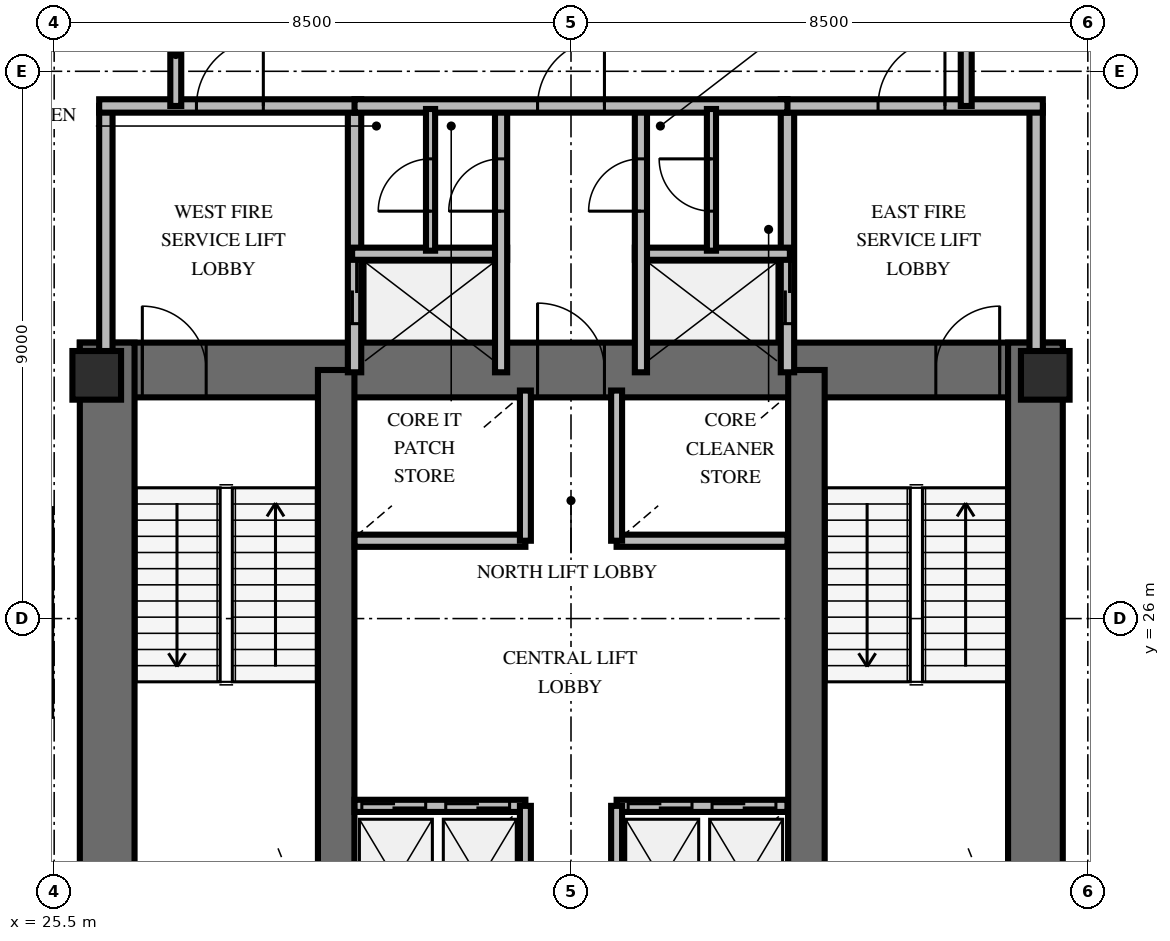
"""IFC4 building model, lengths in metres.
Left out: names, types, materials, properties, quantities, classifications, styles, units other than length and angle.
Written with IfcOpenShell. Run it as: python <this file> out.ifc"""

import sys

from ifc_helpers import new_model, si_unit, direction, frame, frame_2d, origin, origin_2d, place, context, subcontext, project, spatial, rectangle, extrude, element, fill, save


model = new_model("IFC4")
c1 = context("Model", 3, precision=1e-05, world=origin(), true_north=direction((0.0, 1.0)))
c2 = subcontext(c1, "Body", "Model", "MODEL_VIEW")
j1 = project(units=[si_unit("LENGTHUNIT", "METRE"), si_unit("PLANEANGLEUNIT", "RADIAN")], contexts=[c1])
p1 = place(None, origin())
s1 = spatial("IfcSite", under=j1, at=p1, CompositionType="ELEMENT")
p2 = place(p1, origin())
s2 = spatial("IfcBuilding", under=s1, at=p2, CompositionType="ELEMENT")
p3 = place(p2, frame((0.0, 0.0, 55.2)))
s3 = spatial("IfcBuildingStorey", under=s2, at=p3, CompositionType="ELEMENT", Elevation=55.2)
p4 = place(p3, frame((25.922, 30.088, 0.0), z_axis=(0.0, 0.0, 1.0), x_axis=(1.0, 0.0, 0.0)))
e1 = element("IfcWall", 1, at=p4, inside=s3, PredefinedType="SHEAR", context=c2, shape_type="SweptSolid", body=[
    extrude(rectangle(XDim=16.166, YDim=0.9, at=frame_2d((8.083, 0.0))), origin(), (0.0, 0.0, 1.0), 4.2),
])
p5 = place(p4, frame((1.028, 0.0, 0.0)))
e2 = element("IfcOpeningElement", 2, at=p5, cuts=e1, PredefinedType="OPENING", context=c2, shape_type="SweptSolid", body=[
    extrude(rectangle(XDim=1.05, YDim=2.15, at=frame_2d((0.525, 1.075))), frame((0.0, 0.46, 0.0), z_axis=(0.0, -1.0, 0.0), x_axis=(1.0, 0.0, 0.0)), (0.0, 0.0, 1.0), 0.92),
])
p6 = place(p4, frame((14.078, 0.0, 0.0)))
e3 = element("IfcOpeningElement", 3, at=p6, cuts=e1, PredefinedType="OPENING", context=c2, shape_type="SweptSolid", body=[
    extrude(rectangle(XDim=1.05, YDim=2.15, at=frame_2d((0.525, 1.075))), frame((0.0, 0.46, 0.0), z_axis=(0.0, -1.0, 0.0), x_axis=(1.0, 0.0, 0.0)), (0.0, 0.0, 1.0), 0.92),
])
p7 = place(p4, frame((7.528, 0.0, 0.0)))
e4 = element("IfcOpeningElement", 4, at=p7, cuts=e1, PredefinedType="OPENING", context=c2, shape_type="SweptSolid", body=[
    extrude(rectangle(XDim=1.1, YDim=2.15, at=frame_2d((0.55, 1.075))), frame((0.0, 0.46, 0.0), z_axis=(0.0, -1.0, 0.0), x_axis=(1.0, 0.0, 0.0)), (0.0, 0.0, 1.0), 0.92),
])
for number, where, z_axis, x_axis in (
    (5, (26.372, 19.662, 0.0), (0.0, 0.0, 1.0), (0.0, 1.0, 0.0)),
    (6, (41.638, 19.662, 0.0), (0.0, 0.0, 1.0), (0.0, 1.0, 0.0)),
):
    element("IfcWall", number, at=place(p3, frame(where, z_axis=z_axis, x_axis=x_axis)), inside=s3, PredefinedType="SHEAR", context=c2, shape_type="SweptSolid", body=[
        extrude(rectangle(XDim=10.876, YDim=0.9, at=frame_2d((5.438, 0.0))), origin(), (0.0, 0.0, 1.0), 4.2),
    ])
for number, where, z_axis, x_axis in (
    (7, (30.138, 20.112, 0.0), (0.0, 0.0, 1.0), (0.0, 1.0, 0.0)),
    (8, (37.872, 20.112, 0.0), (0.0, 0.0, 1.0), (0.0, 1.0, 0.0)),
):
    element("IfcWall", number, at=place(p3, frame(where, z_axis=z_axis, x_axis=x_axis)), inside=s3, PredefinedType="SHEAR", context=c2, shape_type="SweptSolid", body=[
        extrude(rectangle(XDim=9.976, YDim=0.6, at=frame_2d((4.988, 0.0))), origin(), (0.0, 0.0, 1.0), 4.2),
    ])
for number, where, z_axis, x_axis in (
    (9, (26.2, 30.0, 0.0), (0.0, 0.0, 1.0), (1.0, 0.0, 0.0)),
    (10, (41.8, 30.0, 0.0), (0.0, 0.0, 1.0), (1.0, 0.0, 0.0)),
):
    element("IfcColumn", number, at=place(p3, frame(where, z_axis=z_axis, x_axis=x_axis)), inside=s3, PredefinedType="PILASTER", context=c2, shape_type="SweptSolid", body=[
        extrude(rectangle(XDim=0.8, YDim=0.8, at=origin_2d()), origin(), (0.0, 0.0, 1.0), 4.2),
    ])
p8 = place(p3, frame((26.35, 30.05, 0.0), z_axis=(0.0, 0.0, 1.0), x_axis=(0.0, 1.0, 0.0)))
e11 = element("IfcWall", 11, at=p8, inside=s3, PredefinedType="SOLIDWALL", context=c2, shape_type="SweptSolid", body=[
    extrude(rectangle(XDim=4.38, YDim=0.22, at=frame_2d((2.19, 0.0))), origin(), (0.0, 0.0, 1.0), 3.0),
])
p9 = place(p3, frame((30.44, 30.05, 0.0), z_axis=(0.0, 0.0, 1.0), x_axis=(0.0, 1.0, 0.0)))
e12 = element("IfcWall", 12, at=p9, inside=s3, PredefinedType="SOLIDWALL", context=c2, shape_type="SweptSolid", body=[
    extrude(rectangle(XDim=4.38, YDim=0.22, at=frame_2d((2.19, 0.0))), origin(), (0.0, 0.0, 1.0), 3.0),
])
p10 = place(p9, frame((0.8, 0.0, 0.0)))
e13 = element("IfcOpeningElement", 13, at=p10, cuts=e12, PredefinedType="OPENING", context=c2, shape_type="SweptSolid", body=[
    extrude(rectangle(XDim=1.05, YDim=2.1, at=frame_2d((0.525, 1.05))), frame((0.0, 0.12, 0.0), z_axis=(0.0, -1.0, 0.0), x_axis=(1.0, 0.0, 0.0)), (0.0, 0.0, 1.0), 0.24),
])
p11 = place(p3, frame((26.24, 34.43, 0.0), z_axis=(0.0, 0.0, 1.0), x_axis=(1.0, 0.0, 0.0)))
e14 = element("IfcWall", 14, at=p11, inside=s3, PredefinedType="SOLIDWALL", context=c2, shape_type="SweptSolid", body=[
    extrude(rectangle(XDim=4.31, YDim=0.22, at=frame_2d((2.155, 0.0))), origin(), (0.0, 0.0, 1.0), 3.0),
])
p12 = place(p11, frame((1.6, 0.0, 0.0)))
e15 = element("IfcOpeningElement", 15, at=p12, cuts=e14, PredefinedType="OPENING", context=c2, shape_type="SweptSolid", body=[
    extrude(rectangle(XDim=1.1, YDim=2.15, at=frame_2d((0.55, 1.075))), frame((0.0, 0.12, 0.0), z_axis=(0.0, -1.0, 0.0), x_axis=(1.0, 0.0, 0.0)), (0.0, 0.0, 1.0), 0.24),
])
p13 = place(p3, frame((30.4, 32.0, 0.0), z_axis=(0.0, 0.0, 1.0), x_axis=(1.0, 0.0, 0.0)))
e16 = element("IfcWall", 16, at=p13, inside=s3, PredefinedType="SOLIDWALL", context=c2, shape_type="SweptSolid", body=[
    extrude(rectangle(XDim=2.55, YDim=0.2, at=frame_2d((1.275, 0.0))), origin(), (0.0, 0.0, 1.0), 3.0),
])
p14 = place(p3, frame((32.85, 30.05, 0.0), z_axis=(0.0, 0.0, 1.0), x_axis=(0.0, 1.0, 0.0)))
e17 = element("IfcWall", 17, at=p14, inside=s3, PredefinedType="SOLIDWALL", context=c2, shape_type="SweptSolid", body=[
    extrude(rectangle(XDim=4.38, YDim=0.2, at=frame_2d((2.19, 0.0))), origin(), (0.0, 0.0, 1.0), 3.0),
])
p15 = place(p14, frame((2.65, 0.0, 0.0)))
e18 = element("IfcOpeningElement", 18, at=p15, cuts=e17, PredefinedType="OPENING", context=c2, shape_type="SweptSolid", body=[
    extrude(rectangle(XDim=0.86, YDim=2.05, at=frame_2d((0.43, 1.025))), frame((0.0, 0.11, 0.0), z_axis=(0.0, -1.0, 0.0), x_axis=(1.0, 0.0, 0.0)), (0.0, 0.0, 1.0), 0.22),
])
p16 = place(p3, frame((37.56, 30.05, 0.0), z_axis=(0.0, 0.0, 1.0), x_axis=(0.0, 1.0, 0.0)))
e19 = element("IfcWall", 19, at=p16, inside=s3, PredefinedType="SOLIDWALL", context=c2, shape_type="SweptSolid", body=[
    extrude(rectangle(XDim=4.38, YDim=0.22, at=frame_2d((2.19, 0.0))), origin(), (0.0, 0.0, 1.0), 3.0),
])
p17 = place(p16, frame((0.8, 0.0, 0.0)))
e20 = element("IfcOpeningElement", 20, at=p17, cuts=e19, PredefinedType="OPENING", context=c2, shape_type="SweptSolid", body=[
    extrude(rectangle(XDim=1.05, YDim=2.1, at=frame_2d((0.525, 1.05))), frame((0.0, 0.12, 0.0), z_axis=(0.0, -1.0, 0.0), x_axis=(1.0, 0.0, 0.0)), (0.0, 0.0, 1.0), 0.24),
])
p18 = place(p3, frame((41.65, 30.05, 0.0), z_axis=(0.0, 0.0, 1.0), x_axis=(0.0, 1.0, 0.0)))
e21 = element("IfcWall", 21, at=p18, inside=s3, PredefinedType="SOLIDWALL", context=c2, shape_type="SweptSolid", body=[
    extrude(rectangle(XDim=4.38, YDim=0.22, at=frame_2d((2.19, 0.0))), origin(), (0.0, 0.0, 1.0), 3.0),
])
p19 = place(p3, frame((37.45, 34.43, 0.0), z_axis=(0.0, 0.0, 1.0), x_axis=(1.0, 0.0, 0.0)))
e22 = element("IfcWall", 22, at=p19, inside=s3, PredefinedType="SOLIDWALL", context=c2, shape_type="SweptSolid", body=[
    extrude(rectangle(XDim=4.31, YDim=0.22, at=frame_2d((2.155, 0.0))), origin(), (0.0, 0.0, 1.0), 3.0),
])
p20 = place(p19, frame((1.6, 0.0, 0.0)))
e23 = element("IfcOpeningElement", 23, at=p20, cuts=e22, PredefinedType="OPENING", context=c2, shape_type="SweptSolid", body=[
    extrude(rectangle(XDim=1.1, YDim=2.15, at=frame_2d((0.55, 1.075))), frame((0.0, 0.12, 0.0), z_axis=(0.0, -1.0, 0.0), x_axis=(1.0, 0.0, 0.0)), (0.0, 0.0, 1.0), 0.24),
])
p21 = place(p3, frame((35.05, 32.0, 0.0), z_axis=(0.0, 0.0, 1.0), x_axis=(1.0, 0.0, 0.0)))
e24 = element("IfcWall", 24, at=p21, inside=s3, PredefinedType="SOLIDWALL", context=c2, shape_type="SweptSolid", body=[
    extrude(rectangle(XDim=2.55, YDim=0.2, at=frame_2d((1.275, 0.0))), origin(), (0.0, 0.0, 1.0), 3.0),
])
p22 = place(p3, frame((35.15, 30.05, 0.0), z_axis=(0.0, 0.0, 1.0), x_axis=(0.0, 1.0, 0.0)))
e25 = element("IfcWall", 25, at=p22, inside=s3, PredefinedType="SOLIDWALL", context=c2, shape_type="SweptSolid", body=[
    extrude(rectangle(XDim=4.38, YDim=0.2, at=frame_2d((2.19, 0.0))), origin(), (0.0, 0.0, 1.0), 3.0),
])
p23 = place(p22, frame((2.65, 0.0, 0.0)))
e26 = element("IfcOpeningElement", 26, at=p23, cuts=e25, PredefinedType="OPENING", context=c2, shape_type="SweptSolid", body=[
    extrude(rectangle(XDim=0.86, YDim=2.05, at=frame_2d((0.43, 1.025))), frame((0.0, 0.11, 0.0), z_axis=(0.0, -1.0, 0.0), x_axis=(1.0, 0.0, 0.0)), (0.0, 0.0, 1.0), 0.22),
])
p24 = place(p3, frame((30.44, 34.43, 0.0), z_axis=(0.0, 0.0, 1.0), x_axis=(1.0, 0.0, 0.0)))
e27 = element("IfcWall", 27, at=p24, inside=s3, PredefinedType="SOLIDWALL", context=c2, shape_type="SweptSolid", body=[
    extrude(rectangle(XDim=7.12, YDim=0.22, at=frame_2d((3.56, 0.0))), origin(), (0.0, 0.0, 1.0), 3.0),
])
p25 = place(p24, frame((3.01, 0.0, 0.0)))
e28 = element("IfcOpeningElement", 28, at=p25, cuts=e27, PredefinedType="OPENING", context=c2, shape_type="SweptSolid", body=[
    extrude(rectangle(XDim=1.1, YDim=2.15, at=frame_2d((0.55, 1.075))), frame((0.0, 0.12, 0.0), z_axis=(0.0, -1.0, 0.0), x_axis=(1.0, 0.0, 0.0)), (0.0, 0.0, 1.0), 0.24),
])
p26 = place(p3, frame((31.69, 32.05, 0.0), z_axis=(0.0, 0.0, 1.0), x_axis=(0.0, 1.0, 0.0)))
e29 = element("IfcWall", 29, at=p26, inside=s3, PredefinedType="PARTITIONING", context=c2, shape_type="SweptSolid", body=[
    extrude(rectangle(XDim=2.33, YDim=0.15, at=frame_2d((1.165, 0.0))), origin(), (0.0, 0.0, 1.0), 3.0),
])
p27 = place(p26, frame((0.65, 0.0, 0.0)))
e30 = element("IfcOpeningElement", 30, at=p27, cuts=e29, PredefinedType="OPENING", context=c2, shape_type="SweptSolid", body=[
    extrude(rectangle(XDim=0.86, YDim=2.05, at=frame_2d((0.43, 1.025))), frame((0.0, 0.085, 0.0), z_axis=(0.0, -1.0, 0.0), x_axis=(1.0, 0.0, 0.0)), (0.0, 0.0, 1.0), 0.17),
])
p28 = place(p3, frame((36.31, 32.05, 0.0), z_axis=(0.0, 0.0, 1.0), x_axis=(0.0, 1.0, 0.0)))
e31 = element("IfcWall", 31, at=p28, inside=s3, PredefinedType="PARTITIONING", context=c2, shape_type="SweptSolid", body=[
    extrude(rectangle(XDim=2.33, YDim=0.15, at=frame_2d((1.165, 0.0))), origin(), (0.0, 0.0, 1.0), 3.0),
])
p29 = place(p28, frame((0.65, 0.0, 0.0)))
e32 = element("IfcOpeningElement", 32, at=p29, cuts=e31, PredefinedType="OPENING", context=c2, shape_type="SweptSolid", body=[
    extrude(rectangle(XDim=0.86, YDim=2.05, at=frame_2d((0.43, 1.025))), frame((0.0, 0.085, 0.0), z_axis=(0.0, -1.0, 0.0), x_axis=(1.0, 0.0, 0.0)), (0.0, 0.0, 1.0), 0.17),
])
p30 = place(p3, frame((30.44, 22.92, 0.0), z_axis=(0.0, 0.0, 1.0), x_axis=(1.0, 0.0, 0.0)))
e33 = element("IfcWall", 33, at=p30, inside=s3, PredefinedType="SOLIDWALL", context=c2, shape_type="SweptSolid", body=[
    extrude(rectangle(XDim=2.81, YDim=0.2, at=frame_2d((1.405, 0.0))), origin(), (0.0, 0.0, 1.0), 3.0),
])
p31 = place(p30, frame((0.12, 0.0, 0.0)))
e34 = element("IfcOpeningElement", 34, at=p31, cuts=e33, PredefinedType="OPENING", context=c2, shape_type="SweptSolid", body=[
    extrude(rectangle(XDim=1.05, YDim=2.1, at=frame_2d((0.525, 1.05))), frame((0.0, 0.11, 0.0), z_axis=(0.0, -1.0, 0.0), x_axis=(1.0, 0.0, 0.0)), (0.0, 0.0, 1.0), 0.22),
])
p32 = place(p30, frame((1.5, 0.0, 0.0)))
e35 = element("IfcOpeningElement", 35, at=p32, cuts=e33, PredefinedType="OPENING", context=c2, shape_type="SweptSolid", body=[
    extrude(rectangle(XDim=1.05, YDim=2.1, at=frame_2d((0.525, 1.05))), frame((0.0, 0.11, 0.0), z_axis=(0.0, -1.0, 0.0), x_axis=(1.0, 0.0, 0.0)), (0.0, 0.0, 1.0), 0.22),
])
p33 = place(p3, frame((33.25, 20.5, 0.0), z_axis=(0.0, 0.0, 1.0), x_axis=(0.0, 1.0, 0.0)))
e36 = element("IfcWall", 36, at=p33, inside=s3, PredefinedType="SOLIDWALL", context=c2, shape_type="SweptSolid", body=[
    extrude(rectangle(XDim=2.42, YDim=0.18, at=frame_2d((1.21, 0.0))), origin(), (0.0, 0.0, 1.0), 3.0),
])
p34 = place(p3, frame((34.75, 22.92, 0.0), z_axis=(0.0, 0.0, 1.0), x_axis=(1.0, 0.0, 0.0)))
e37 = element("IfcWall", 37, at=p34, inside=s3, PredefinedType="SOLIDWALL", context=c2, shape_type="SweptSolid", body=[
    extrude(rectangle(XDim=2.81, YDim=0.2, at=frame_2d((1.405, 0.0))), origin(), (0.0, 0.0, 1.0), 3.0),
])
p35 = place(p34, frame((0.19, 0.0, 0.0)))
e38 = element("IfcOpeningElement", 38, at=p35, cuts=e37, PredefinedType="OPENING", context=c2, shape_type="SweptSolid", body=[
    extrude(rectangle(XDim=1.05, YDim=2.1, at=frame_2d((0.525, 1.05))), frame((0.0, 0.11, 0.0), z_axis=(0.0, -1.0, 0.0), x_axis=(1.0, 0.0, 0.0)), (0.0, 0.0, 1.0), 0.22),
])
p36 = place(p34, frame((1.57, 0.0, 0.0)))
e39 = element("IfcOpeningElement", 39, at=p36, cuts=e37, PredefinedType="OPENING", context=c2, shape_type="SweptSolid", body=[
    extrude(rectangle(XDim=1.05, YDim=2.1, at=frame_2d((0.525, 1.05))), frame((0.0, 0.11, 0.0), z_axis=(0.0, -1.0, 0.0), x_axis=(1.0, 0.0, 0.0)), (0.0, 0.0, 1.0), 0.22),
])
p37 = place(p3, frame((34.75, 20.5, 0.0), z_axis=(0.0, 0.0, 1.0), x_axis=(0.0, 1.0, 0.0)))
e40 = element("IfcWall", 40, at=p37, inside=s3, PredefinedType="SOLIDWALL", context=c2, shape_type="SweptSolid", body=[
    extrude(rectangle(XDim=2.42, YDim=0.18, at=frame_2d((1.21, 0.0))), origin(), (0.0, 0.0, 1.0), 3.0),
])
p38 = place(p3, frame((30.44, 27.28, 0.0), z_axis=(0.0, 0.0, 1.0), x_axis=(1.0, 0.0, 0.0)))
e41 = element("IfcWall", 41, at=p38, inside=s3, PredefinedType="SOLIDWALL", context=c2, shape_type="SweptSolid", body=[
    extrude(rectangle(XDim=2.81, YDim=0.2, at=frame_2d((1.405, 0.0))), origin(), (0.0, 0.0, 1.0), 3.0),
])
p39 = place(p3, frame((33.25, 27.28, 0.0), z_axis=(0.0, 0.0, 1.0), x_axis=(0.0, 1.0, 0.0)))
e42 = element("IfcWall", 42, at=p39, inside=s3, PredefinedType="SOLIDWALL", context=c2, shape_type="SweptSolid", body=[
    extrude(rectangle(XDim=2.47, YDim=0.18, at=frame_2d((1.235, 0.0))), origin(), (0.0, 0.0, 1.0), 3.0),
])
p40 = place(p3, frame((34.75, 27.28, 0.0), z_axis=(0.0, 0.0, 1.0), x_axis=(1.0, 0.0, 0.0)))
e43 = element("IfcWall", 43, at=p40, inside=s3, PredefinedType="SOLIDWALL", context=c2, shape_type="SweptSolid", body=[
    extrude(rectangle(XDim=2.81, YDim=0.2, at=frame_2d((1.405, 0.0))), origin(), (0.0, 0.0, 1.0), 3.0),
])
p41 = place(p3, frame((34.75, 27.28, 0.0), z_axis=(0.0, 0.0, 1.0), x_axis=(0.0, 1.0, 0.0)))
e44 = element("IfcWall", 44, at=p41, inside=s3, PredefinedType="SOLIDWALL", context=c2, shape_type="SweptSolid", body=[
    extrude(rectangle(XDim=2.47, YDim=0.18, at=frame_2d((1.235, 0.0))), origin(), (0.0, 0.0, 1.0), 3.0),
])
for number, where, z_axis, x_axis in (
    (45, (27.5, 34.43, 0.0), (0.0, 0.0, 1.0), (0.0, 1.0, 0.0)),
    (46, (40.5, 36.123, 0.0), (0.0, 0.0, 1.0), (0.0, -1.0, 0.0)),
):
    element("IfcWall", number, at=place(p3, frame(where, z_axis=z_axis, x_axis=x_axis)), inside=s3, PredefinedType="PARTITIONING", context=c2, shape_type="SweptSolid", body=[
        extrude(rectangle(XDim=1.693, YDim=0.18, at=frame_2d((0.846, 0.0))), origin(), (0.0, 0.0, 1.0), 3.0),
    ])
p42 = place(p5, origin())
e47 = element("IfcDoor", 47, at=p42, inside=s3, OperationType="SINGLE_SWING_LEFT", PredefinedType="DOOR", context=c2, shape_type="SweptSolid", body=[
    extrude(rectangle(XDim=1.05, YDim=2.15, at=frame_2d((0.525, 1.075))), frame((0.0, 0.025, 0.0), z_axis=(0.0, -1.0, 0.0), x_axis=(1.0, 0.0, 0.0)), (0.0, 0.0, 1.0), 0.05),
])
fill(e2, e47)
p43 = place(p6, origin())
e48 = element("IfcDoor", 48, at=p43, inside=s3, OperationType="SINGLE_SWING_RIGHT", PredefinedType="DOOR", context=c2, shape_type="SweptSolid", body=[
    extrude(rectangle(XDim=1.05, YDim=2.15, at=frame_2d((0.525, 1.075))), frame((0.0, 0.025, 0.0), z_axis=(0.0, -1.0, 0.0), x_axis=(1.0, 0.0, 0.0)), (0.0, 0.0, 1.0), 0.05),
])
fill(e3, e48)
p44 = place(p7, origin())
e49 = element("IfcDoor", 49, at=p44, inside=s3, OperationType="SINGLE_SWING_LEFT", PredefinedType="DOOR", context=c2, shape_type="SweptSolid", body=[
    extrude(rectangle(XDim=1.1, YDim=2.15, at=frame_2d((0.55, 1.075))), frame((0.0, 0.025, 0.0), z_axis=(0.0, -1.0, 0.0), x_axis=(1.0, 0.0, 0.0)), (0.0, 0.0, 1.0), 0.05),
])
fill(e4, e49)
p45 = place(p12, origin())
e50 = element("IfcDoor", 50, at=p45, inside=s3, OperationType="SINGLE_SWING_RIGHT", PredefinedType="DOOR", context=c2, shape_type="SweptSolid", body=[
    extrude(rectangle(XDim=1.1, YDim=2.15, at=frame_2d((0.55, 1.075))), frame((0.0, 0.025, 0.0), z_axis=(0.0, -1.0, 0.0), x_axis=(1.0, 0.0, 0.0)), (0.0, 0.0, 1.0), 0.05),
])
fill(e15, e50)
p46 = place(p10, origin())
e51 = element("IfcDoor", 51, at=p46, inside=s3, OperationType="DOUBLE_DOOR_SLIDING", PredefinedType="USERDEFINED", context=c2, shape_type="SweptSolid", body=[
    extrude(rectangle(XDim=1.05, YDim=2.1, at=frame_2d((0.525, 1.05))), frame((0.0, 0.025, 0.0), z_axis=(0.0, -1.0, 0.0), x_axis=(1.0, 0.0, 0.0)), (0.0, 0.0, 1.0), 0.05),
])
fill(e13, e51)
p47 = place(p15, origin())
e52 = element("IfcDoor", 52, at=p47, inside=s3, OperationType="SINGLE_SWING_LEFT", PredefinedType="TRAPDOOR", context=c2, shape_type="SweptSolid", body=[
    extrude(rectangle(XDim=0.86, YDim=2.05, at=frame_2d((0.43, 1.025))), frame((0.0, 0.025, 0.0), z_axis=(0.0, -1.0, 0.0), x_axis=(1.0, 0.0, 0.0)), (0.0, 0.0, 1.0), 0.05),
])
fill(e18, e52)
p48 = place(p20, origin())
e53 = element("IfcDoor", 53, at=p48, inside=s3, OperationType="SINGLE_SWING_RIGHT", PredefinedType="DOOR", context=c2, shape_type="SweptSolid", body=[
    extrude(rectangle(XDim=1.1, YDim=2.15, at=frame_2d((0.55, 1.075))), frame((0.0, 0.025, 0.0), z_axis=(0.0, -1.0, 0.0), x_axis=(1.0, 0.0, 0.0)), (0.0, 0.0, 1.0), 0.05),
])
fill(e23, e53)
p49 = place(p17, origin())
e54 = element("IfcDoor", 54, at=p49, inside=s3, OperationType="DOUBLE_DOOR_SLIDING", PredefinedType="USERDEFINED", context=c2, shape_type="SweptSolid", body=[
    extrude(rectangle(XDim=1.05, YDim=2.1, at=frame_2d((0.525, 1.05))), frame((0.0, 0.025, 0.0), z_axis=(0.0, -1.0, 0.0), x_axis=(1.0, 0.0, 0.0)), (0.0, 0.0, 1.0), 0.05),
])
fill(e20, e54)
p50 = place(p23, origin())
e55 = element("IfcDoor", 55, at=p50, inside=s3, OperationType="SINGLE_SWING_LEFT", PredefinedType="TRAPDOOR", context=c2, shape_type="SweptSolid", body=[
    extrude(rectangle(XDim=0.86, YDim=2.05, at=frame_2d((0.43, 1.025))), frame((0.0, 0.025, 0.0), z_axis=(0.0, -1.0, 0.0), x_axis=(1.0, 0.0, 0.0)), (0.0, 0.0, 1.0), 0.05),
])
fill(e26, e55)
p51 = place(p25, origin())
e56 = element("IfcDoor", 56, at=p51, inside=s3, OperationType="SINGLE_SWING_RIGHT", PredefinedType="DOOR", context=c2, shape_type="SweptSolid", body=[
    extrude(rectangle(XDim=1.1, YDim=2.15, at=frame_2d((0.55, 1.075))), frame((0.0, 0.025, 0.0), z_axis=(0.0, -1.0, 0.0), x_axis=(1.0, 0.0, 0.0)), (0.0, 0.0, 1.0), 0.05),
])
fill(e28, e56)
p52 = place(p27, origin())
e57 = element("IfcDoor", 57, at=p52, inside=s3, OperationType="SINGLE_SWING_LEFT", PredefinedType="TRAPDOOR", context=c2, shape_type="SweptSolid", body=[
    extrude(rectangle(XDim=0.86, YDim=2.05, at=frame_2d((0.43, 1.025))), frame((0.0, 0.025, 0.0), z_axis=(0.0, -1.0, 0.0), x_axis=(1.0, 0.0, 0.0)), (0.0, 0.0, 1.0), 0.05),
])
fill(e30, e57)
p53 = place(p29, origin())
e58 = element("IfcDoor", 58, at=p53, inside=s3, OperationType="SINGLE_SWING_RIGHT", PredefinedType="TRAPDOOR", context=c2, shape_type="SweptSolid", body=[
    extrude(rectangle(XDim=0.86, YDim=2.05, at=frame_2d((0.43, 1.025))), frame((0.0, 0.025, 0.0), z_axis=(0.0, -1.0, 0.0), x_axis=(1.0, 0.0, 0.0)), (0.0, 0.0, 1.0), 0.05),
])
fill(e32, e58)
p54 = place(p31, origin())
e59 = element("IfcDoor", 59, at=p54, inside=s3, OperationType="DOUBLE_DOOR_SLIDING", PredefinedType="USERDEFINED", context=c2, shape_type="SweptSolid", body=[
    extrude(rectangle(XDim=1.05, YDim=2.1, at=frame_2d((0.525, 1.05))), frame((0.0, 0.025, 0.0), z_axis=(0.0, -1.0, 0.0), x_axis=(1.0, 0.0, 0.0)), (0.0, 0.0, 1.0), 0.05),
])
fill(e34, e59)
p55 = place(p32, origin())
e60 = element("IfcDoor", 60, at=p55, inside=s3, OperationType="DOUBLE_DOOR_SLIDING", PredefinedType="USERDEFINED", context=c2, shape_type="SweptSolid", body=[
    extrude(rectangle(XDim=1.05, YDim=2.1, at=frame_2d((0.525, 1.05))), frame((0.0, 0.025, 0.0), z_axis=(0.0, -1.0, 0.0), x_axis=(1.0, 0.0, 0.0)), (0.0, 0.0, 1.0), 0.05),
])
fill(e35, e60)
p56 = place(p35, origin())
e61 = element("IfcDoor", 61, at=p56, inside=s3, OperationType="DOUBLE_DOOR_SLIDING", PredefinedType="USERDEFINED", context=c2, shape_type="SweptSolid", body=[
    extrude(rectangle(XDim=1.05, YDim=2.1, at=frame_2d((0.525, 1.05))), frame((0.0, 0.025, 0.0), z_axis=(0.0, -1.0, 0.0), x_axis=(1.0, 0.0, 0.0)), (0.0, 0.0, 1.0), 0.05),
])
fill(e38, e61)
p57 = place(p36, origin())
e62 = element("IfcDoor", 62, at=p57, inside=s3, OperationType="DOUBLE_DOOR_SLIDING", PredefinedType="USERDEFINED", context=c2, shape_type="SweptSolid", body=[
    extrude(rectangle(XDim=1.05, YDim=2.1, at=frame_2d((0.525, 1.05))), frame((0.0, 0.025, 0.0), z_axis=(0.0, -1.0, 0.0), x_axis=(1.0, 0.0, 0.0)), (0.0, 0.0, 1.0), 0.05),
])
fill(e39, e62)
save(model, sys.argv[1])
